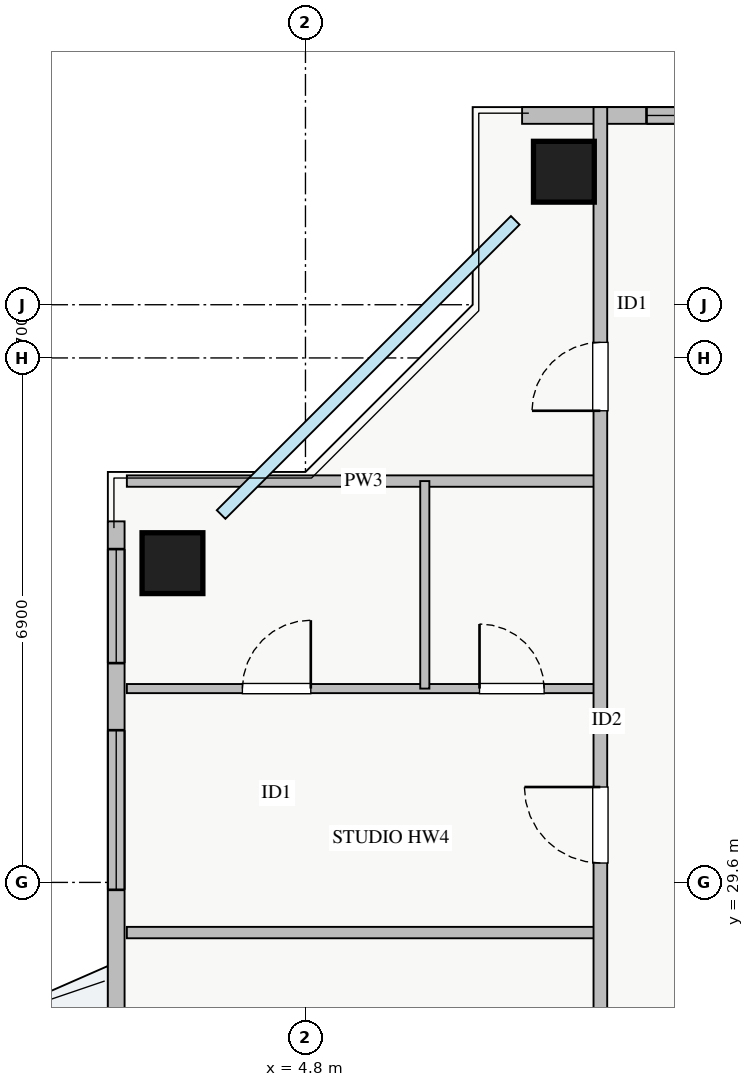
"""IFC4 building model, lengths in metres.
Left out: names, types, materials, properties, quantities, classifications, styles, units other than length and angle.
Written with IfcOpenShell. Run it as: python <this file> out.ifc"""

import sys

from ifc_helpers import new_model, si_unit, direction, frame, frame_2d, origin, origin_2d, place, context, subcontext, project, spatial, rectangle, extrude, source, transform, mapped, element, fill, save


model = new_model("IFC4")
c1 = context("Model", 3, precision=1e-05, world=origin(), true_north=direction((0.0, 1.0)))
c2 = subcontext(c1, "Body", "Model", "MODEL_VIEW")
j1 = project(units=[si_unit("LENGTHUNIT", "METRE"), si_unit("PLANEANGLEUNIT", "RADIAN")], contexts=[c1])
p1 = place(None, origin())
s1 = spatial("IfcSite", under=j1, at=p1, CompositionType="ELEMENT")
p2 = place(p1, origin())
s2 = spatial("IfcBuilding", under=s1, at=p2, CompositionType="ELEMENT")
p3 = place(p2, frame((0.0, 0.0, 210.0)))
s3 = spatial("IfcBuildingStorey", under=s2, at=p3, CompositionType="ELEMENT", Elevation=210.0)
m1 = source(origin(), c2, "Body", "SweptSolid", [
    extrude(rectangle(XDim=0.8, YDim=0.8, at=origin_2d()), origin(), (0.0, 0.0, 1.0), 3.25),
])
for number, where, z_axis, x_axis in (
    (1, (8.2, 38.95, 0.0), (0.0, 0.0, 1.0), (1.0, 0.0, 0.0)),
    (2, (3.05, 33.8, 0.0), (0.0, 0.0, 1.0), (1.0, 0.0, 0.0)),
):
    element("IfcColumn", number, at=place(p3, frame(where, z_axis=z_axis, x_axis=x_axis)), inside=s3, PredefinedType="COLUMN", context=c2, shape_type="MappedRepresentation", body=[
        mapped(m1, transform((0.0, 0.0, 0.0), x_axis=(1.0, 0.0, 0.0), y_axis=(0.0, 1.0, 0.0), z_axis=(0.0, 0.0, 1.0), scale=1.0)),
    ])
p4 = place(p3, frame((7.65, 39.69, 0.0), z_axis=(0.0, 0.0, 1.0), x_axis=(1.0, 0.0, 0.0)))
e3 = element("IfcWall", 3, at=p4, inside=s3, PredefinedType="STANDARD", context=c2, shape_type="SweptSolid", body=[
    extrude(rectangle(XDim=22.7, YDim=0.22, at=frame_2d((11.35, 0.0))), origin(), (0.0, 0.0, 1.0), 2.61),
])
p5 = place(p4, frame((12.2, 0.0, 0.0)))
e4 = element("IfcOpeningElement", 4, at=p5, cuts=e3, PredefinedType="OPENING", context=c2, shape_type="SweptSolid", body=[
    extrude(rectangle(XDim=1.2, YDim=2.1, at=frame_2d((0.6, 1.05))), frame((0.0, 0.12, 0.0), z_axis=(0.0, -1.0, 0.0), x_axis=(1.0, 0.0, 0.0)), (0.0, 0.0, 1.0), 0.24),
])
p6 = place(p4, frame((1.637, 0.0, 0.9)))
e5 = element("IfcOpeningElement", 5, at=p6, cuts=e3, PredefinedType="OPENING", context=c2, shape_type="SweptSolid", body=[
    extrude(rectangle(XDim=2.4, YDim=1.48, at=frame_2d((1.2, 0.74))), frame((0.0, 0.12, 0.0), z_axis=(0.0, -1.0, 0.0), x_axis=(1.0, 0.0, 0.0)), (0.0, 0.0, 1.0), 0.24),
])
p7 = place(p4, frame((7.612, 0.0, 0.9)))
e6 = element("IfcOpeningElement", 6, at=p7, cuts=e3, PredefinedType="OPENING", context=c2, shape_type="SweptSolid", body=[
    extrude(rectangle(XDim=1.8, YDim=1.45, at=frame_2d((0.9, 0.725))), frame((0.0, 0.12, 0.0), z_axis=(0.0, -1.0, 0.0), x_axis=(1.0, 0.0, 0.0)), (0.0, 0.0, 1.0), 0.24),
])
p8 = place(p4, frame((20.238, 0.0, 0.9)))
e7 = element("IfcOpeningElement", 7, at=p8, cuts=e3, PredefinedType="OPENING", context=c2, shape_type="SweptSolid", body=[
    extrude(rectangle(XDim=2.1, YDim=1.5, at=frame_2d((1.05, 0.75))), frame((0.0, 0.12, 0.0), z_axis=(0.0, -1.0, 0.0), x_axis=(1.0, 0.0, 0.0)), (0.0, 0.0, 1.0), 0.24),
])
p9 = place(p4, frame((17.02, 0.0, 0.9)))
e8 = element("IfcOpeningElement", 8, at=p9, cuts=e3, PredefinedType="OPENING", context=c2, shape_type="SweptSolid", body=[
    extrude(rectangle(XDim=2.4, YDim=1.5, at=frame_2d((1.2, 0.75))), frame((0.0, 0.12, 0.0), z_axis=(0.0, -1.0, 0.0), x_axis=(1.0, 0.0, 0.0)), (0.0, 0.0, 1.0), 0.24),
])
p10 = place(p3, frame((2.31, 11.65, 0.0), z_axis=(0.0, 0.0, 1.0), x_axis=(0.0, 1.0, 0.0)))
e9 = element("IfcWall", 9, at=p10, inside=s3, PredefinedType="STANDARD", context=c2, shape_type="SweptSolid", body=[
    extrude(rectangle(XDim=22.7, YDim=0.22, at=frame_2d((11.35, 0.0))), origin(), (0.0, 0.0, 1.0), 2.61),
])
p11 = place(p10, frame((12.2, 0.0, 0.0)))
e10 = element("IfcOpeningElement", 10, at=p11, cuts=e9, PredefinedType="OPENING", context=c2, shape_type="SweptSolid", body=[
    extrude(rectangle(XDim=1.2, YDim=2.1, at=frame_2d((0.6, 1.05))), frame((0.0, 0.12, 0.0), z_axis=(0.0, -1.0, 0.0), x_axis=(1.0, 0.0, 0.0)), (0.0, 0.0, 1.0), 0.24),
])
p12 = place(p10, frame((2.607, 0.0, 0.9)))
e11 = element("IfcOpeningElement", 11, at=p12, cuts=e9, PredefinedType="OPENING", context=c2, shape_type="SweptSolid", body=[
    extrude(rectangle(XDim=1.8, YDim=1.5, at=frame_2d((0.9, 0.75))), frame((0.0, 0.12, 0.0), z_axis=(0.0, -1.0, 0.0), x_axis=(1.0, 0.0, 0.0)), (0.0, 0.0, 1.0), 0.24),
])
p13 = place(p10, frame((17.853, 0.0, 0.9)))
e12 = element("IfcOpeningElement", 12, at=p13, cuts=e9, PredefinedType="OPENING", context=c2, shape_type="SweptSolid", body=[
    extrude(rectangle(XDim=2.1, YDim=1.5, at=frame_2d((1.05, 0.75))), frame((0.0, 0.12, 0.0), z_axis=(0.0, -1.0, 0.0), x_axis=(1.0, 0.0, 0.0)), (0.0, 0.0, 1.0), 0.24),
])
p14 = place(p10, frame((0.385, 0.0, 0.9)))
e13 = element("IfcOpeningElement", 13, at=p14, cuts=e9, PredefinedType="OPENING", context=c2, shape_type="SweptSolid", body=[
    extrude(rectangle(XDim=1.5, YDim=1.5, at=frame_2d((0.75, 0.75))), frame((0.0, 0.12, 0.0), z_axis=(0.0, -1.0, 0.0), x_axis=(1.0, 0.0, 0.0)), (0.0, 0.0, 1.0), 0.24),
])
p15 = place(p10, frame((20.835, 0.0, 0.9)))
e14 = element("IfcOpeningElement", 14, at=p15, cuts=e9, PredefinedType="OPENING", context=c2, shape_type="SweptSolid", body=[
    extrude(rectangle(XDim=1.5, YDim=1.5, at=frame_2d((0.75, 0.75))), frame((0.0, 0.12, 0.0), z_axis=(0.0, -1.0, 0.0), x_axis=(1.0, 0.0, 0.0)), (0.0, 0.0, 1.0), 0.24),
])
p16 = place(p10, frame((5.025, 0.0, 0.9)))
e15 = element("IfcOpeningElement", 15, at=p16, cuts=e9, PredefinedType="OPENING", context=c2, shape_type="SweptSolid", body=[
    extrude(rectangle(XDim=0.9, YDim=1.2, at=frame_2d((0.45, 0.6))), frame((0.0, 0.12, 0.0), z_axis=(0.0, -1.0, 0.0), x_axis=(1.0, 0.0, 0.0)), (0.0, 0.0, 1.0), 0.24),
])
p17 = place(p3, frame((2.45, 34.88, 0.0), z_axis=(0.0, 0.0, 1.0), x_axis=(1.0, 0.0, 0.0)))
e16 = element("IfcWall", 16, at=p17, inside=s3, PredefinedType="PARTITIONING", context=c2, shape_type="SweptSolid", body=[
    extrude(rectangle(XDim=6.23, YDim=0.15, at=frame_2d((3.115, 0.0))), origin(), (0.0, 0.0, 1.0), 3.07),
])
p18 = place(p3, frame((2.45, 32.15, 0.0), z_axis=(0.0, 0.0, 1.0), x_axis=(1.0, 0.0, 0.0)))
e17 = element("IfcWall", 17, at=p18, inside=s3, PredefinedType="PLUMBINGWALL", context=c2, shape_type="SweptSolid", body=[
    extrude(rectangle(XDim=6.23, YDim=0.12, at=frame_2d((3.115, 0.0))), origin(), (0.0, 0.0, 1.0), 3.07),
])
p19 = place(p18, frame((1.52, 0.0, 0.0)))
e18 = element("IfcOpeningElement", 18, at=p19, cuts=e17, PredefinedType="OPENING", context=c2, shape_type="SweptSolid", body=[
    extrude(rectangle(XDim=0.9, YDim=2.05, at=frame_2d((0.45, 1.025))), frame((0.0, 0.07, 0.0), z_axis=(0.0, -1.0, 0.0), x_axis=(1.0, 0.0, 0.0)), (0.0, 0.0, 1.0), 0.14),
])
p20 = place(p18, frame((4.64, 0.0, 0.0)))
e19 = element("IfcOpeningElement", 19, at=p20, cuts=e17, PredefinedType="OPENING", context=c2, shape_type="SweptSolid", body=[
    extrude(rectangle(XDim=0.85, YDim=2.05, at=frame_2d((0.425, 1.025))), frame((0.0, 0.07, 0.0), z_axis=(0.0, -1.0, 0.0), x_axis=(1.0, 0.0, 0.0)), (0.0, 0.0, 1.0), 0.14),
])
p21 = place(p3, frame((6.37, 32.15, 0.0), z_axis=(0.0, 0.0, 1.0), x_axis=(0.0, 1.0, 0.0)))
e20 = element("IfcWall", 20, at=p21, inside=s3, PredefinedType="PLUMBINGWALL", context=c2, shape_type="SweptSolid", body=[
    extrude(rectangle(XDim=2.73, YDim=0.12, at=frame_2d((1.365, 0.0))), origin(), (0.0, 0.0, 1.0), 3.07),
])
p22 = place(p3, frame((2.45, 28.94, 0.0), z_axis=(0.0, 0.0, 1.0), x_axis=(1.0, 0.0, 0.0)))
e21 = element("IfcWall", 21, at=p22, inside=s3, PredefinedType="PARTITIONING", context=c2, shape_type="SweptSolid", body=[
    extrude(rectangle(XDim=6.23, YDim=0.15, at=frame_2d((3.115, 0.0))), origin(), (0.0, 0.0, 1.0), 3.07),
])
p23 = place(p3, frame((8.68, 6.2, 0.0), z_axis=(0.0, 0.0, 1.0), x_axis=(0.0, 1.0, 0.0)))
e22 = element("IfcWall", 22, at=p23, inside=s3, PredefinedType="PARTITIONING", context=c2, shape_type="SweptSolid", body=[
    extrude(rectangle(XDim=33.6, YDim=0.18, at=frame_2d((16.8, 0.0))), origin(), (0.0, 0.0, 1.0), 3.07),
])
p24 = place(p23, frame((29.605, 0.0, 0.0)))
e23 = element("IfcOpeningElement", 23, at=p24, cuts=e22, PredefinedType="OPENING", context=c2, shape_type="SweptSolid", body=[
    extrude(rectangle(XDim=0.9, YDim=2.05, at=frame_2d((0.45, 1.025))), frame((0.0, 0.1, 0.0), z_axis=(0.0, -1.0, 0.0), x_axis=(1.0, 0.0, 0.0)), (0.0, 0.0, 1.0), 0.2),
])
p25 = place(p23, frame((2.92, 0.0, 0.0)))
e24 = element("IfcOpeningElement", 24, at=p25, cuts=e22, PredefinedType="OPENING", context=c2, shape_type="SweptSolid", body=[
    extrude(rectangle(XDim=0.9, YDim=2.05, at=frame_2d((0.45, 1.025))), frame((0.0, 0.1, 0.0), z_axis=(0.0, -1.0, 0.0), x_axis=(1.0, 0.0, 0.0)), (0.0, 0.0, 1.0), 0.2),
])
p26 = place(p23, frame((5.615, 0.0, 0.0)))
e25 = element("IfcOpeningElement", 25, at=p26, cuts=e22, PredefinedType="OPENING", context=c2, shape_type="SweptSolid", body=[
    extrude(rectangle(XDim=1.0, YDim=2.05, at=frame_2d((0.5, 1.025))), frame((0.0, 0.1, 0.0), z_axis=(0.0, -1.0, 0.0), x_axis=(1.0, 0.0, 0.0)), (0.0, 0.0, 1.0), 0.2),
])
p27 = place(p23, frame((10.54, 0.0, 0.0)))
e26 = element("IfcOpeningElement", 26, at=p27, cuts=e22, PredefinedType="OPENING", context=c2, shape_type="SweptSolid", body=[
    extrude(rectangle(XDim=1.0, YDim=2.05, at=frame_2d((0.5, 1.025))), frame((0.0, 0.1, 0.0), z_axis=(0.0, -1.0, 0.0), x_axis=(1.0, 0.0, 0.0)), (0.0, 0.0, 1.0), 0.2),
])
p28 = place(p23, frame((19.27, 0.0, 0.0)))
e27 = element("IfcOpeningElement", 27, at=p28, cuts=e22, PredefinedType="OPENING", context=c2, shape_type="SweptSolid", body=[
    extrude(rectangle(XDim=1.0, YDim=2.05, at=frame_2d((0.5, 1.025))), frame((0.0, 0.1, 0.0), z_axis=(0.0, -1.0, 0.0), x_axis=(1.0, 0.0, 0.0)), (0.0, 0.0, 1.0), 0.2),
])
p29 = place(p23, frame((23.655, 0.0, 0.0)))
e28 = element("IfcOpeningElement", 28, at=p29, cuts=e22, PredefinedType="OPENING", context=c2, shape_type="SweptSolid", body=[
    extrude(rectangle(XDim=1.0, YDim=2.05, at=frame_2d((0.5, 1.025))), frame((0.0, 0.1, 0.0), z_axis=(0.0, -1.0, 0.0), x_axis=(1.0, 0.0, 0.0)), (0.0, 0.0, 1.0), 0.2),
])
m2 = source(origin(), c2, "Body", "SweptSolid", [
    extrude(rectangle(XDim=2.4, YDim=1.48, at=frame_2d((1.2, 0.74))), frame((0.0, 0.03, 0.0), z_axis=(0.0, -1.0, 0.0), x_axis=(1.0, 0.0, 0.0)), (0.0, 0.0, 1.0), 0.06),
])
p30 = place(p6, origin())
e29 = element("IfcWindow", 29, at=p30, inside=s3, PartitioningType="TRIPLE_PANEL_VERTICAL", PredefinedType="WINDOW", context=c2, shape_type="MappedRepresentation", body=[
    mapped(m2, transform((0.0, 0.0, 0.0), x_axis=(1.0, 0.0, 0.0), y_axis=(0.0, 1.0, 0.0), z_axis=(0.0, 0.0, 1.0), scale=1.0)),
])
fill(e5, e29)
m3 = source(origin(), c2, "Body", "SweptSolid", [
    extrude(rectangle(XDim=2.1, YDim=1.5, at=frame_2d((1.05, 0.75))), frame((0.0, 0.03, 0.0), z_axis=(0.0, -1.0, 0.0), x_axis=(1.0, 0.0, 0.0)), (0.0, 0.0, 1.0), 0.06),
])
p31 = place(p13, origin())
e30 = element("IfcWindow", 30, at=p31, inside=s3, PartitioningType="TRIPLE_PANEL_VERTICAL", PredefinedType="WINDOW", context=c2, shape_type="MappedRepresentation", body=[
    mapped(m3, transform((0.0, 0.0, 0.0), x_axis=(1.0, 0.0, 0.0), y_axis=(0.0, 1.0, 0.0), z_axis=(0.0, 0.0, 1.0), scale=1.0)),
])
fill(e12, e30)
m4 = source(origin(), c2, "Body", "SweptSolid", [
    extrude(rectangle(XDim=0.9, YDim=2.05, at=frame_2d((0.45, 1.025))), frame((0.0, 0.025, 0.0), z_axis=(0.0, -1.0, 0.0), x_axis=(1.0, 0.0, 0.0)), (0.0, 0.0, 1.0), 0.05),
])
p32 = place(p19, origin())
e31 = element("IfcDoor", 31, at=p32, inside=s3, OperationType="SINGLE_SWING_RIGHT", PredefinedType="DOOR", context=c2, shape_type="MappedRepresentation", body=[
    mapped(m4, transform((0.0, 0.0, 0.0), x_axis=(1.0, 0.0, 0.0), y_axis=(0.0, 1.0, 0.0), z_axis=(0.0, 0.0, 1.0), scale=1.0)),
])
fill(e18, e31)
m5 = source(origin(), c2, "Body", "SweptSolid", [
    extrude(rectangle(XDim=0.85, YDim=2.05, at=frame_2d((0.425, 1.025))), frame((0.0, 0.025, 0.0), z_axis=(0.0, -1.0, 0.0), x_axis=(1.0, 0.0, 0.0)), (0.0, 0.0, 1.0), 0.05),
])
p33 = place(p20, origin())
e32 = element("IfcDoor", 32, at=p33, inside=s3, OperationType="SINGLE_SWING_LEFT", PredefinedType="DOOR", context=c2, shape_type="MappedRepresentation", body=[
    mapped(m5, transform((0.0, 0.0, 0.0), x_axis=(1.0, 0.0, 0.0), y_axis=(0.0, 1.0, 0.0), z_axis=(0.0, 0.0, 1.0), scale=1.0)),
])
fill(e19, e32)
p34 = place(p24, origin())
e33 = element("IfcDoor", 33, at=p34, inside=s3, OperationType="SINGLE_SWING_LEFT", PredefinedType="DOOR", context=c2, shape_type="MappedRepresentation", body=[
    mapped(m4, transform((0.0, 0.0, 0.0), x_axis=(1.0, 0.0, 0.0), y_axis=(0.0, 1.0, 0.0), z_axis=(0.0, 0.0, 1.0), scale=1.0)),
])
fill(e23, e33)
m6 = source(origin(), c2, "Body", "SweptSolid", [
    extrude(rectangle(XDim=1.0, YDim=2.05, at=frame_2d((0.5, 1.025))), frame((0.0, 0.025, 0.0), z_axis=(0.0, -1.0, 0.0), x_axis=(1.0, 0.0, 0.0)), (0.0, 0.0, 1.0), 0.05),
])
p35 = place(p29, origin())
e34 = element("IfcDoor", 34, at=p35, inside=s3, OperationType="SINGLE_SWING_RIGHT", PredefinedType="DOOR", context=c2, shape_type="MappedRepresentation", body=[
    mapped(m6, transform((0.0, 0.0, 0.0), x_axis=(1.0, 0.0, 0.0), y_axis=(0.0, 1.0, 0.0), z_axis=(0.0, 0.0, 1.0), scale=1.0)),
])
fill(e28, e34)
m7 = source(origin(), c2, "Body", "SweptSolid", [
    extrude(rectangle(XDim=1.5, YDim=1.5, at=frame_2d((0.75, 0.75))), frame((0.0, 0.03, 0.0), z_axis=(0.0, -1.0, 0.0), x_axis=(1.0, 0.0, 0.0)), (0.0, 0.0, 1.0), 0.06),
])
p36 = place(p15, origin())
e35 = element("IfcWindow", 35, at=p36, inside=s3, PartitioningType="DOUBLE_PANEL_VERTICAL", PredefinedType="WINDOW", context=c2, shape_type="MappedRepresentation", body=[
    mapped(m7, transform((0.0, 0.0, 0.0), x_axis=(1.0, 0.0, 0.0), y_axis=(0.0, 1.0, 0.0), z_axis=(0.0, 0.0, 1.0), scale=1.0)),
])
fill(e14, e35)
save(model, sys.argv[1])
